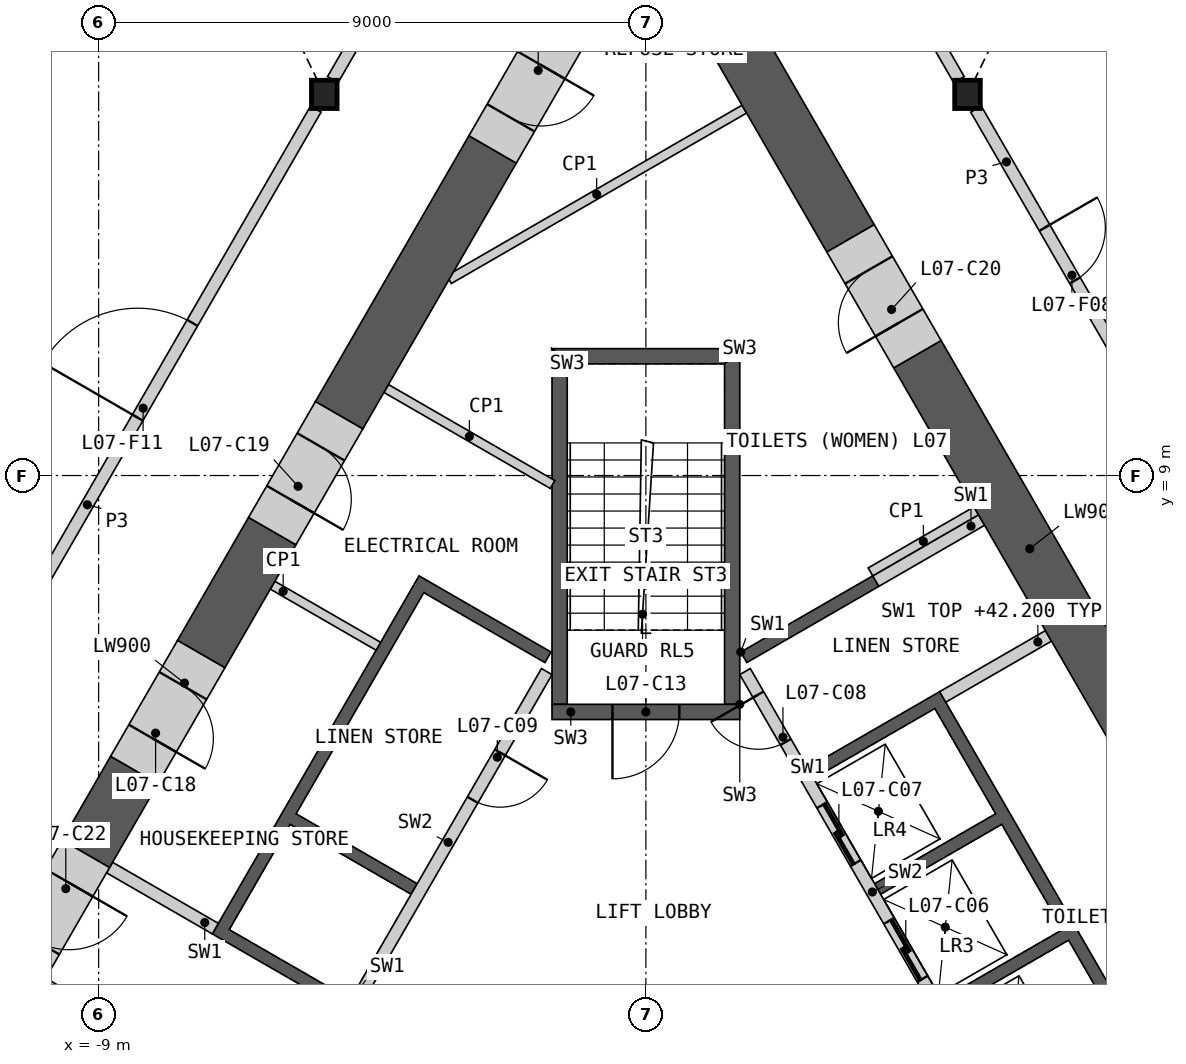
"""IFC4 building model, lengths in metres.
Left out: names, types, materials, properties, quantities, classifications, styles, units other than length and angle.
Written with IfcOpenShell. Run it as: python <this file> out.ifc"""

import sys

from ifc_helpers import new_model, si_unit, direction, frame, frame_2d, origin, origin_2d, place, context, subcontext, project, spatial, polyline, rectangle, i_section, outline, extrude, element, fill, save


model = new_model("IFC4")
c1 = context("Model", 3, precision=1e-05, world=origin(), true_north=direction((0.0, 1.0)))
c2 = subcontext(c1, "Body", "Model", "MODEL_VIEW")
j1 = project(units=[si_unit("LENGTHUNIT", "METRE"), si_unit("PLANEANGLEUNIT", "RADIAN")], contexts=[c1])
p1 = place(None, origin())
s1 = spatial("IfcSite", under=j1, at=p1, CompositionType="ELEMENT")
p2 = place(p1, origin())
s2 = spatial("IfcBuilding", under=s1, at=p2, CompositionType="ELEMENT")
p3 = place(p2, frame((0.0, 0.0, 38.4)))
s3 = spatial("IfcBuildingStorey", under=s2, at=p3, CompositionType="ELEMENT", Elevation=38.4)
for number, where, z_axis, x_axis in (
    (1, (-5.289, 15.269, 0.0), (0.0, 0.0, 1.0), (1.0, 0.0, 0.0)),
    (2, (5.289, 15.269, 0.0), (0.0, 0.0, 1.0), (1.0, 0.0, 0.0)),
):
    element("IfcColumn", number, at=place(p3, frame(where, z_axis=z_axis, x_axis=x_axis)), inside=s3, PredefinedType="COLUMN", context=c2, shape_type="SweptSolid", body=[
        extrude(i_section(OverallWidth=0.421, OverallDepth=0.465, WebThickness=0.045, FlangeThickness=0.072, at=origin_2d()), origin(), (0.0, 0.0, 1.0), 4.2),
    ])
p4 = place(p3, origin())
e3 = element("IfcWall", 3, at=p4, inside=s3, PredefinedType="SHEAR", context=c2, shape_type="SweptSolid", body=[
    extrude(outline(polyline([(1.561, 6.097), (3.731, 7.35), (3.831, 7.177), (1.66, 5.924), (1.561, 6.097)])), origin(), (0.0, 0.0, 1.0), 3.8),
])
p5 = place(p3, origin())
e4 = element("IfcWall", 4, at=p5, inside=s3, PredefinedType="SHEAR", context=c2, shape_type="SweptSolid", body=[
    extrude(outline(polyline([(2.66, 4.192), (4.831, 5.445), (8.231, -0.444), (6.061, -1.697), (5.96, -1.524), (7.952, -0.374), (6.952, 1.358), (4.96, 0.208), (4.861, 0.381), (6.852, 1.531), (5.852, 3.263), (3.861, 2.113), (3.76, 2.287), (5.752, 3.437), (4.752, 5.169), (2.76, 4.019), (2.66, 4.192)])), origin(), (0.0, 0.0, 1.0), 3.8),
])
p6 = place(p3, frame((5.817, -1.476, 0.0), z_axis=(0.0, 0.0, 1.0), x_axis=(-0.500002616675, 0.866023893041, 0.0)))
e5 = element("IfcWall", 5, at=p6, inside=s3, PredefinedType="SOLIDWALL", context=c2, shape_type="SweptSolid", body=[
    extrude(rectangle(XDim=8.373, YDim=0.2, at=frame_2d((4.187, 0.0))), origin(), (0.0, 0.0, 1.0), 3.8),
])
p7 = place(p6, frame((0.337, 0.0, 0.0)))
e6 = element("IfcOpeningElement", 6, at=p7, cuts=e5, PredefinedType="OPENING", context=c2, shape_type="SweptSolid", body=[
    extrude(rectangle(XDim=1.1, YDim=2.1, at=frame_2d((0.55, 1.05))), frame((0.0, 0.11, 0.0), z_axis=(0.0, -1.0, 0.0), x_axis=(1.0, 0.0, 0.0)), (0.0, 0.0, 1.0), 0.22),
])
p8 = place(p6, frame((2.537, 0.0, 0.0)))
e7 = element("IfcOpeningElement", 7, at=p8, cuts=e5, PredefinedType="OPENING", context=c2, shape_type="SweptSolid", body=[
    extrude(rectangle(XDim=1.1, YDim=2.1, at=frame_2d((0.55, 1.05))), frame((0.0, 0.11, 0.0), z_axis=(0.0, -1.0, 0.0), x_axis=(1.0, 0.0, 0.0)), (0.0, 0.0, 1.0), 0.22),
])
p9 = place(p6, frame((4.737, 0.0, 0.0)))
e8 = element("IfcOpeningElement", 8, at=p9, cuts=e5, PredefinedType="OPENING", context=c2, shape_type="SweptSolid", body=[
    extrude(rectangle(XDim=1.1, YDim=2.1, at=frame_2d((0.55, 1.05))), frame((0.0, 0.11, 0.0), z_axis=(0.0, -1.0, 0.0), x_axis=(1.0, 0.0, 0.0)), (0.0, 0.0, 1.0), 0.22),
])
p10 = place(p6, frame((7.037, 0.0, 0.0)))
e9 = element("IfcOpeningElement", 9, at=p10, cuts=e5, PredefinedType="OPENING", context=c2, shape_type="SweptSolid", body=[
    extrude(rectangle(XDim=0.9, YDim=2.1, at=frame_2d((0.45, 1.05))), frame((0.0, 0.11, 0.0), z_axis=(0.0, -1.0, 0.0), x_axis=(1.0, 0.0, 0.0)), (0.0, 0.0, 1.0), 0.22),
])
p11 = place(p3, frame((4.881, 5.358, 0.0), z_axis=(0.0, 0.0, 1.0), x_axis=(0.866035824272, 0.499981950752, 0.0)))
e10 = element("IfcWall", 10, at=p11, inside=s3, PredefinedType="SHEAR", context=c2, shape_type="SweptSolid", body=[
    extrude(rectangle(XDim=2.009, YDim=0.2, at=frame_2d((1.004, 0.0))), origin(), (0.0, 0.0, 1.0), 3.8),
])
p12 = place(p3, frame((3.781, 7.263, 0.0), z_axis=(0.0, 0.0, 1.0), x_axis=(0.865983199114, 0.50007309351, 0.0)))
e11 = element("IfcWall", 11, at=p12, inside=s3, PredefinedType="SHEAR", context=c2, shape_type="SweptSolid", body=[
    extrude(rectangle(XDim=2.009, YDim=0.2, at=frame_2d((1.004, 0.0))), origin(), (0.0, 0.0, 1.0), 3.8),
])
p13 = place(p3, origin())
e12 = element("IfcWall", 12, at=p13, inside=s3, PredefinedType="SHEAR", context=c2, shape_type="SweptSolid", body=[
    extrude(outline(polyline([(-4.96, 0.208), (-7.131, 1.461), (-3.731, 7.35), (-1.561, 6.097), (-1.66, 5.924), (-3.652, 7.074), (-5.752, 3.437), (-3.76, 2.287), (-3.861, 2.113), (-5.852, 3.263), (-6.852, 1.531), (-4.861, 0.381), (-4.96, 0.208)])), origin(), (0.0, 0.0, 1.0), 3.8),
])
p14 = place(p3, frame((-1.631, 5.776, 0.0), z_axis=(0.0, 0.0, 1.0), x_axis=(-0.499992876559, -0.866029516466, 0.0)))
e13 = element("IfcWall", 13, at=p14, inside=s3, PredefinedType="SOLIDWALL", context=c2, shape_type="SweptSolid", body=[
    extrude(rectangle(XDim=6.486, YDim=0.2, at=frame_2d((3.243, 0.0))), origin(), (0.0, 0.0, 1.0), 3.8),
])
p15 = place(p14, frame((1.537, 0.0, 0.0)))
e14 = element("IfcOpeningElement", 14, at=p15, cuts=e13, PredefinedType="OPENING", context=c2, shape_type="SweptSolid", body=[
    extrude(rectangle(XDim=0.9, YDim=2.1, at=frame_2d((0.45, 1.05))), frame((0.0, 0.11, 0.0), z_axis=(0.0, -1.0, 0.0), x_axis=(1.0, 0.0, 0.0)), (0.0, 0.0, 1.0), 0.22),
])
p16 = place(p3, frame((-7.081, 1.548, 0.0), z_axis=(0.0, 0.0, 1.0), x_axis=(-0.865983199114, 0.50007309351, 0.0)))
e15 = element("IfcWall", 15, at=p16, inside=s3, PredefinedType="SHEAR", context=c2, shape_type="SweptSolid", body=[
    extrude(rectangle(XDim=2.009, YDim=0.2, at=frame_2d((1.004, 0.0))), origin(), (0.0, 0.0, 1.0), 3.8),
])
p17 = place(p3, frame((-8.181, -0.357, 0.0), z_axis=(0.0, 0.0, 1.0), x_axis=(-0.866035824272, 0.499981950752, 0.0)))
e16 = element("IfcWall", 16, at=p17, inside=s3, PredefinedType="SHEAR", context=c2, shape_type="SweptSolid", body=[
    extrude(rectangle(XDim=2.009, YDim=0.2, at=frame_2d((1.004, 0.0))), origin(), (0.0, 0.0, 1.0), 3.8),
])
p18 = place(p3, origin())
e17 = element("IfcWall", 17, at=p18, inside=s3, PredefinedType="SHEAR", context=c2, shape_type="SweptSolid", body=[
    extrude(outline(polyline([(1.544, 5.237), (1.544, 11.087), (1.294, 10.837), (1.294, 5.237), (1.544, 5.237)])), origin(), (0.0, 0.0, 1.0), 3.8),
])
p19 = place(p3, origin())
e18 = element("IfcWall", 18, at=p19, inside=s3, PredefinedType="SHEAR", context=c2, shape_type="SweptSolid", body=[
    extrude(outline(polyline([(1.544, 11.087), (-1.544, 11.087), (-1.294, 10.837), (1.294, 10.837), (1.544, 11.087)])), origin(), (0.0, 0.0, 1.0), 3.8),
])
p20 = place(p3, origin())
e19 = element("IfcWall", 19, at=p20, inside=s3, PredefinedType="SHEAR", context=c2, shape_type="SweptSolid", body=[
    extrude(outline(polyline([(-1.294, 10.837), (-1.544, 11.087), (-1.544, 5.237), (-1.294, 5.237), (-1.294, 10.837)])), origin(), (0.0, 0.0, 1.0), 3.8),
])
p21 = place(p3, frame((1.544, 5.112, 0.0), z_axis=(0.0, 0.0, 1.0), x_axis=(-1.0, 0.0, 0.0)))
e20 = element("IfcWall", 20, at=p21, inside=s3, PredefinedType="SHEAR", context=c2, shape_type="SweptSolid", body=[
    extrude(rectangle(XDim=3.088, YDim=0.25, at=frame_2d((1.544, 0.0))), origin(), (0.0, 0.0, 1.0), 3.8),
])
p22 = place(p21, frame((0.994, 0.0, 0.0)))
e21 = element("IfcOpeningElement", 21, at=p22, cuts=e20, PredefinedType="OPENING", context=c2, shape_type="SweptSolid", body=[
    extrude(rectangle(XDim=1.1, YDim=2.1, at=frame_2d((0.55, 1.05))), frame((0.0, 0.135, 0.0), z_axis=(0.0, -1.0, 0.0), x_axis=(1.0, 0.0, 0.0)), (0.0, 0.0, 1.0), 0.27),
])
for number, where, z_axis, x_axis in (
    (22, (3.693, 7.415, 0.0), (0.0, 0.0, 1.0), (0.866, 0.5, 0.0)),
    (23, (-6.139, 7.196, 0.0), (0.0, 0.0, 1.0), (0.866, -0.5, 0.0)),
):
    element("IfcWall", number, at=place(p3, frame(where, z_axis=z_axis, x_axis=x_axis)), inside=s3, PredefinedType="PARTITIONING", context=c2, shape_type="SweptSolid", body=[
        extrude(rectangle(XDim=2.009, YDim=0.15, at=frame_2d((1.004, 0.0))), origin(), (0.0, 0.0, 1.0), 3.8),
    ])
p23 = place(p3, frame((-4.271, 10.432, 0.0), z_axis=(0.0, 0.0, 1.0), x_axis=(0.866018279777, -0.50001233894, 0.0)))
e24 = element("IfcWall", 24, at=p23, inside=s3, PredefinedType="PARTITIONING", context=c2, shape_type="SweptSolid", body=[
    extrude(rectangle(XDim=3.159, YDim=0.15, at=frame_2d((1.58, 0.0))), origin(), (0.0, 0.0, 1.0), 3.8),
])
p24 = place(p3, frame((1.619, 15.026, 0.0), z_axis=(0.0, 0.0, 1.0), x_axis=(-0.866015917575, -0.500016430238, 0.0)))
e25 = element("IfcWall", 25, at=p24, inside=s3, PredefinedType="PARTITIONING", context=c2, shape_type="SweptSolid", body=[
    extrude(rectangle(XDim=5.607, YDim=0.15, at=frame_2d((2.804, 0.0))), origin(), (0.0, 0.0, 1.0), 3.8),
])
p25 = place(p3, frame((8.16, 4.596, 0.0), z_axis=(0.0, 0.0, 1.0), x_axis=(-0.500012259336, 0.866018325738, 0.0)))
e26 = element("IfcWall", 26, at=p25, inside=s3, PredefinedType="SHEAR", context=c2, shape_type="SweptSolid", body=[
    extrude(rectangle(XDim=7.389, YDim=0.9, at=frame_2d((3.695, 0.0))), origin(), (0.0, 0.0, 1.0), 3.8),
])
p26 = place(p3, frame((3.365, 12.9, 0.0), z_axis=(0.0, 0.0, 1.0), x_axis=(-0.499981657175, 0.86603599376, 0.0)))
e27 = element("IfcWall", 27, at=p26, inside=s3, PredefinedType="SHEAR", context=c2, shape_type="SweptSolid", body=[
    extrude(rectangle(XDim=5.952, YDim=0.9, at=frame_2d((2.976, 0.0))), origin(), (0.0, 0.0, 1.0), 3.8),
])
p27 = place(p3, frame((-2.521, 14.364, 0.0), z_axis=(0.0, 0.0, 1.0), x_axis=(-0.500014099723, -0.866017263153, 0.0)))
e28 = element("IfcWall", 28, at=p27, inside=s3, PredefinedType="SHEAR", context=c2, shape_type="SweptSolid", body=[
    extrude(rectangle(XDim=5.048, YDim=0.9, at=frame_2d((2.524, 0.0))), origin(), (0.0, 0.0, 1.0), 3.8),
])
p28 = place(p3, frame((-6.145, 8.086, 0.0), z_axis=(0.0, 0.0, 1.0), x_axis=(-0.500026924946, -0.866009858102, 0.0)))
e29 = element("IfcWall", 29, at=p28, inside=s3, PredefinedType="SHEAR", context=c2, shape_type="SweptSolid", body=[
    extrude(rectangle(XDim=2.337, YDim=0.9, at=frame_2d((1.168, 0.0))), origin(), (0.0, 0.0, 1.0), 3.8),
])
p29 = place(p3, frame((-8.413, 4.157, 0.0), z_axis=(0.0, 0.0, 1.0), x_axis=(-0.499961121316, -0.86604784924, 0.0)))
e30 = element("IfcWall", 30, at=p29, inside=s3, PredefinedType="SHEAR", context=c2, shape_type="SweptSolid", body=[
    extrude(rectangle(XDim=1.594, YDim=0.9, at=frame_2d((0.797, 0.0))), origin(), (0.0, 0.0, 1.0), 3.8),
])
p30 = place(p3, frame((-7.313, 6.062, 0.0), z_axis=(0.0, 0.0, 1.0), x_axis=(-0.500077893725, -0.86598042715, 0.0)))
e31 = element("IfcWall", 31, at=p30, inside=s3, PredefinedType="SHEAR", context=c2, shape_type="SweptSolid", body=[
    extrude(rectangle(XDim=2.2, YDim=0.9, at=frame_2d((1.1, 0.0))), origin(), (0.0, 0.0, 1.0), 3.8),
])
p31 = place(p30, frame((0.6, 0.0, 0.0)))
e32 = element("IfcOpeningElement", 32, at=p31, cuts=e31, PredefinedType="OPENING", context=c2, shape_type="SweptSolid", body=[
    extrude(rectangle(XDim=1.0, YDim=2.1, at=frame_2d((0.5, 1.05))), frame((0.0, 0.46, 0.0), z_axis=(0.0, -1.0, 0.0), x_axis=(1.0, 0.0, 0.0)), (0.0, 0.0, 1.0), 0.92),
])
p32 = place(p3, frame((-5.045, 9.992, 0.0), z_axis=(0.0, 0.0, 1.0), x_axis=(-0.499898558967, -0.866083962871, 0.0)))
e33 = element("IfcWall", 33, at=p32, inside=s3, PredefinedType="SHEAR", context=c2, shape_type="SweptSolid", body=[
    extrude(rectangle(XDim=2.2, YDim=0.9, at=frame_2d((1.1, 0.0))), origin(), (0.0, 0.0, 1.0), 3.8),
])
p33 = place(p32, frame((0.6, 0.0, 0.0)))
e34 = element("IfcOpeningElement", 34, at=p33, cuts=e33, PredefinedType="OPENING", context=c2, shape_type="SweptSolid", body=[
    extrude(rectangle(XDim=1.0, YDim=2.1, at=frame_2d((0.5, 1.05))), frame((0.0, 0.46, 0.0), z_axis=(0.0, -1.0, 0.0), x_axis=(1.0, 0.0, 0.0)), (0.0, 0.0, 1.0), 0.92),
])
p34 = place(p3, frame((4.466, 10.995, 0.0), z_axis=(0.0, 0.0, 1.0), x_axis=(-0.500077893725, 0.86598042715, 0.0)))
e35 = element("IfcWall", 35, at=p34, inside=s3, PredefinedType="SHEAR", context=c2, shape_type="SweptSolid", body=[
    extrude(rectangle(XDim=2.2, YDim=0.9, at=frame_2d((1.1, 0.0))), origin(), (0.0, 0.0, 1.0), 3.8),
])
p35 = place(p34, frame((0.6, 0.0, 0.0)))
e36 = element("IfcOpeningElement", 36, at=p35, cuts=e35, PredefinedType="OPENING", context=c2, shape_type="SweptSolid", body=[
    extrude(rectangle(XDim=1.0, YDim=2.1, at=frame_2d((0.5, 1.05))), frame((0.0, 0.46, 0.0), z_axis=(0.0, -1.0, 0.0), x_axis=(1.0, 0.0, 0.0)), (0.0, 0.0, 1.0), 0.92),
])
p36 = place(p3, frame((-1.421, 16.269, 0.0), z_axis=(0.0, 0.0, 1.0), x_axis=(-0.50002983664, -0.866008176907, 0.0)))
e37 = element("IfcWall", 37, at=p36, inside=s3, PredefinedType="SHEAR", context=c2, shape_type="SweptSolid", body=[
    extrude(rectangle(XDim=2.2, YDim=0.9, at=frame_2d((1.1, 0.0))), origin(), (0.0, 0.0, 1.0), 3.8),
])
p37 = place(p36, frame((0.6, 0.0, 0.0)))
e38 = element("IfcOpeningElement", 38, at=p37, cuts=e37, PredefinedType="OPENING", context=c2, shape_type="SweptSolid", body=[
    extrude(rectangle(XDim=1.0, YDim=2.1, at=frame_2d((0.5, 1.05))), frame((0.0, 0.46, 0.0), z_axis=(0.0, -1.0, 0.0), x_axis=(1.0, 0.0, 0.0)), (0.0, 0.0, 1.0), 0.92),
])
p38 = place(p3, frame((-9.21, 2.777, 0.0), z_axis=(0.0, 0.0, 1.0), x_axis=(-0.500077893725, -0.86598042715, 0.0)))
e39 = element("IfcWall", 39, at=p38, inside=s3, PredefinedType="SHEAR", context=c2, shape_type="SweptSolid", body=[
    extrude(rectangle(XDim=2.2, YDim=0.9, at=frame_2d((1.1, 0.0))), origin(), (0.0, 0.0, 1.0), 3.8),
])
p39 = place(p38, frame((0.55, 0.0, 0.0)))
e40 = element("IfcOpeningElement", 40, at=p39, cuts=e39, PredefinedType="OPENING", context=c2, shape_type="SweptSolid", body=[
    extrude(rectangle(XDim=1.1, YDim=2.1, at=frame_2d((0.55, 1.05))), frame((0.0, 0.46, 0.0), z_axis=(0.0, -1.0, 0.0), x_axis=(1.0, 0.0, 0.0)), (0.0, 0.0, 1.0), 0.92),
])
p40 = place(p3, frame((5.429, 15.026, 0.0), z_axis=(0.0, 0.0, 1.0), x_axis=(0.50001002959, -0.86601961312, 0.0)))
e41 = element("IfcWall", 41, at=p40, inside=s3, PredefinedType="PARTITIONING", context=c2, shape_type="SweptSolid", body=[
    extrude(rectangle(XDim=10.019, YDim=0.2, at=frame_2d((5.009, 0.0))), origin(), (0.0, 0.0, 1.0), 3.8),
])
p41 = place(p40, frame((7.266, 0.0, 0.0)))
e42 = element("IfcOpeningElement", 42, at=p41, cuts=e41, PredefinedType="OPENING", context=c2, shape_type="SweptSolid", body=[
    extrude(rectangle(XDim=1.0, YDim=2.1, at=frame_2d((0.5, 1.05))), frame((0.0, 0.11, 0.0), z_axis=(0.0, -1.0, 0.0), x_axis=(1.0, 0.0, 0.0)), (0.0, 0.0, 1.0), 0.22),
])
p42 = place(p40, frame((2.254, 0.0, 0.0)))
e43 = element("IfcOpeningElement", 43, at=p42, cuts=e41, PredefinedType="OPENING", context=c2, shape_type="SweptSolid", body=[
    extrude(rectangle(XDim=1.0, YDim=2.1, at=frame_2d((0.5, 1.05))), frame((0.0, 0.11, 0.0), z_axis=(0.0, -1.0, 0.0), x_axis=(1.0, 0.0, 0.0)), (0.0, 0.0, 1.0), 0.22),
])
p43 = place(p3, frame((-10.439, 6.35, 0.0), z_axis=(0.0, 0.0, 1.0), x_axis=(0.50001002959, 0.86601961312, 0.0)))
e44 = element("IfcWall", 44, at=p43, inside=s3, PredefinedType="PARTITIONING", context=c2, shape_type="SweptSolid", body=[
    extrude(rectangle(XDim=10.019, YDim=0.2, at=frame_2d((5.009, 0.0))), origin(), (0.0, 0.0, 1.0), 3.8),
])
p44 = place(p43, frame((4.16, 0.0, 0.0)))
e45 = element("IfcOpeningElement", 45, at=p44, cuts=e44, PredefinedType="OPENING", context=c2, shape_type="SweptSolid", body=[
    extrude(rectangle(XDim=1.8, YDim=2.1, at=frame_2d((0.9, 1.05))), frame((0.0, 0.11, 0.0), z_axis=(0.0, -1.0, 0.0), x_axis=(1.0, 0.0, 0.0)), (0.0, 0.0, 1.0), 0.22),
])
p45 = place(p3, frame((-5.149, 15.511, 0.0), z_axis=(0.0, 0.0, 1.0), x_axis=(0.500001069878, 0.866024786089, 0.0)))
e46 = element("IfcWall", 46, at=p45, inside=s3, PredefinedType="PARTITIONING", context=c2, shape_type="SweptSolid", body=[
    extrude(rectangle(XDim=6.473, YDim=0.2, at=frame_2d((3.236, 0.0))), origin(), (0.0, 0.0, 1.0), 3.8),
])
p46 = place(p3, frame((1.913, 21.116, 0.0), z_axis=(0.0, 0.0, 1.0), x_axis=(0.500001069878, -0.866024786089, 0.0)))
e47 = element("IfcWall", 47, at=p46, inside=s3, PredefinedType="PARTITIONING", context=c2, shape_type="SweptSolid", body=[
    extrude(rectangle(XDim=6.473, YDim=0.2, at=frame_2d((3.236, 0.0))), origin(), (0.0, 0.0, 1.0), 3.8),
])
p47 = place(p46, frame((0.96, 0.0, 0.0)))
e48 = element("IfcOpeningElement", 48, at=p47, cuts=e47, PredefinedType="OPENING", context=c2, shape_type="SweptSolid", body=[
    extrude(rectangle(XDim=1.0, YDim=2.1, at=frame_2d((0.5, 1.05))), frame((0.0, 0.11, 0.0), z_axis=(0.0, -1.0, 0.0), x_axis=(1.0, 0.0, 0.0)), (0.0, 0.0, 1.0), 0.22),
])
p48 = place(p8, origin())
e49 = element("IfcDoor", 49, at=p48, inside=s3, OperationType="SLIDING_TO_LEFT", PredefinedType="DOOR", context=c2, shape_type="SweptSolid", body=[
    extrude(rectangle(XDim=1.1, YDim=2.1, at=frame_2d((0.55, 1.05))), frame((0.0, 0.025, 0.0), z_axis=(0.0, -1.0, 0.0), x_axis=(1.0, 0.0, 0.0)), (0.0, 0.0, 1.0), 0.05),
])
fill(e7, e49)
p49 = place(p9, origin())
e50 = element("IfcDoor", 50, at=p49, inside=s3, OperationType="SLIDING_TO_LEFT", PredefinedType="DOOR", context=c2, shape_type="SweptSolid", body=[
    extrude(rectangle(XDim=1.1, YDim=2.1, at=frame_2d((0.55, 1.05))), frame((0.0, 0.025, 0.0), z_axis=(0.0, -1.0, 0.0), x_axis=(1.0, 0.0, 0.0)), (0.0, 0.0, 1.0), 0.05),
])
fill(e8, e50)
p50 = place(p10, origin())
e51 = element("IfcDoor", 51, at=p50, inside=s3, OperationType="SINGLE_SWING_RIGHT", PredefinedType="DOOR", context=c2, shape_type="SweptSolid", body=[
    extrude(rectangle(XDim=0.9, YDim=2.1, at=frame_2d((0.45, 1.05))), frame((0.0, 0.025, 0.0), z_axis=(0.0, -1.0, 0.0), x_axis=(1.0, 0.0, 0.0)), (0.0, 0.0, 1.0), 0.05),
])
fill(e9, e51)
p51 = place(p15, origin())
e52 = element("IfcDoor", 52, at=p51, inside=s3, OperationType="SINGLE_SWING_LEFT", PredefinedType="DOOR", context=c2, shape_type="SweptSolid", body=[
    extrude(rectangle(XDim=0.9, YDim=2.1, at=frame_2d((0.45, 1.05))), frame((0.0, 0.025, 0.0), z_axis=(0.0, -1.0, 0.0), x_axis=(1.0, 0.0, 0.0)), (0.0, 0.0, 1.0), 0.05),
])
fill(e14, e52)
p52 = place(p22, origin())
e53 = element("IfcDoor", 53, at=p52, inside=s3, OperationType="SINGLE_SWING_RIGHT", PredefinedType="DOOR", context=c2, shape_type="SweptSolid", body=[
    extrude(rectangle(XDim=1.1, YDim=2.1, at=frame_2d((0.55, 1.05))), frame((0.0, 0.025, 0.0), z_axis=(0.0, -1.0, 0.0), x_axis=(1.0, 0.0, 0.0)), (0.0, 0.0, 1.0), 0.05),
])
fill(e21, e53)
p53 = place(p31, origin())
e54 = element("IfcDoor", 54, at=p53, inside=s3, OperationType="SINGLE_SWING_RIGHT", PredefinedType="DOOR", context=c2, shape_type="SweptSolid", body=[
    extrude(rectangle(XDim=1.0, YDim=2.1, at=frame_2d((0.5, 1.05))), frame((0.0, 0.205, 0.0), z_axis=(0.0, -1.0, 0.0), x_axis=(1.0, 0.0, 0.0)), (0.0, 0.0, 1.0), 0.05),
])
fill(e32, e54)
p54 = place(p33, origin())
e55 = element("IfcDoor", 55, at=p54, inside=s3, OperationType="SINGLE_SWING_RIGHT", PredefinedType="DOOR", context=c2, shape_type="SweptSolid", body=[
    extrude(rectangle(XDim=1.0, YDim=2.1, at=frame_2d((0.5, 1.05))), frame((0.0, 0.205, 0.0), z_axis=(0.0, -1.0, 0.0), x_axis=(1.0, 0.0, 0.0)), (0.0, 0.0, 1.0), 0.05),
])
fill(e34, e55)
p55 = place(p35, origin())
e56 = element("IfcDoor", 56, at=p55, inside=s3, OperationType="SINGLE_SWING_LEFT", PredefinedType="DOOR", context=c2, shape_type="SweptSolid", body=[
    extrude(rectangle(XDim=1.0, YDim=2.1, at=frame_2d((0.5, 1.05))), frame((0.0, 0.205, 0.0), z_axis=(0.0, -1.0, 0.0), x_axis=(1.0, 0.0, 0.0)), (0.0, 0.0, 1.0), 0.05),
])
fill(e36, e56)
p56 = place(p37, origin())
e57 = element("IfcDoor", 57, at=p56, inside=s3, OperationType="SINGLE_SWING_LEFT", PredefinedType="DOOR", context=c2, shape_type="SweptSolid", body=[
    extrude(rectangle(XDim=1.0, YDim=2.1, at=frame_2d((0.5, 1.05))), frame((0.0, 0.205, 0.0), z_axis=(0.0, -1.0, 0.0), x_axis=(1.0, 0.0, 0.0)), (0.0, 0.0, 1.0), 0.05),
])
fill(e38, e57)
p57 = place(p39, origin())
e58 = element("IfcDoor", 58, at=p57, inside=s3, OperationType="SINGLE_SWING_LEFT", PredefinedType="DOOR", context=c2, shape_type="SweptSolid", body=[
    extrude(rectangle(XDim=1.1, YDim=2.1, at=frame_2d((0.55, 1.05))), frame((0.0, 0.205, 0.0), z_axis=(0.0, -1.0, 0.0), x_axis=(1.0, 0.0, 0.0)), (0.0, 0.0, 1.0), 0.05),
])
fill(e40, e58)
p58 = place(p42, origin())
e59 = element("IfcDoor", 59, at=p58, inside=s3, OperationType="SINGLE_SWING_LEFT", PredefinedType="DOOR", context=c2, shape_type="SweptSolid", body=[
    extrude(rectangle(XDim=1.0, YDim=2.1, at=frame_2d((0.5, 1.05))), frame((0.0, 0.025, 0.0), z_axis=(0.0, -1.0, 0.0), x_axis=(1.0, 0.0, 0.0)), (0.0, 0.0, 1.0), 0.05),
])
fill(e43, e59)
p59 = place(p44, origin())
e60 = element("IfcDoor", 60, at=p59, inside=s3, OperationType="DOUBLE_DOOR_SINGLE_SWING", PredefinedType="DOOR", context=c2, shape_type="SweptSolid", body=[
    extrude(rectangle(XDim=1.8, YDim=2.1, at=frame_2d((0.9, 1.05))), frame((0.0, 0.025, 0.0), z_axis=(0.0, -1.0, 0.0), x_axis=(1.0, 0.0, 0.0)), (0.0, 0.0, 1.0), 0.05),
])
fill(e45, e60)
save(model, sys.argv[1])
